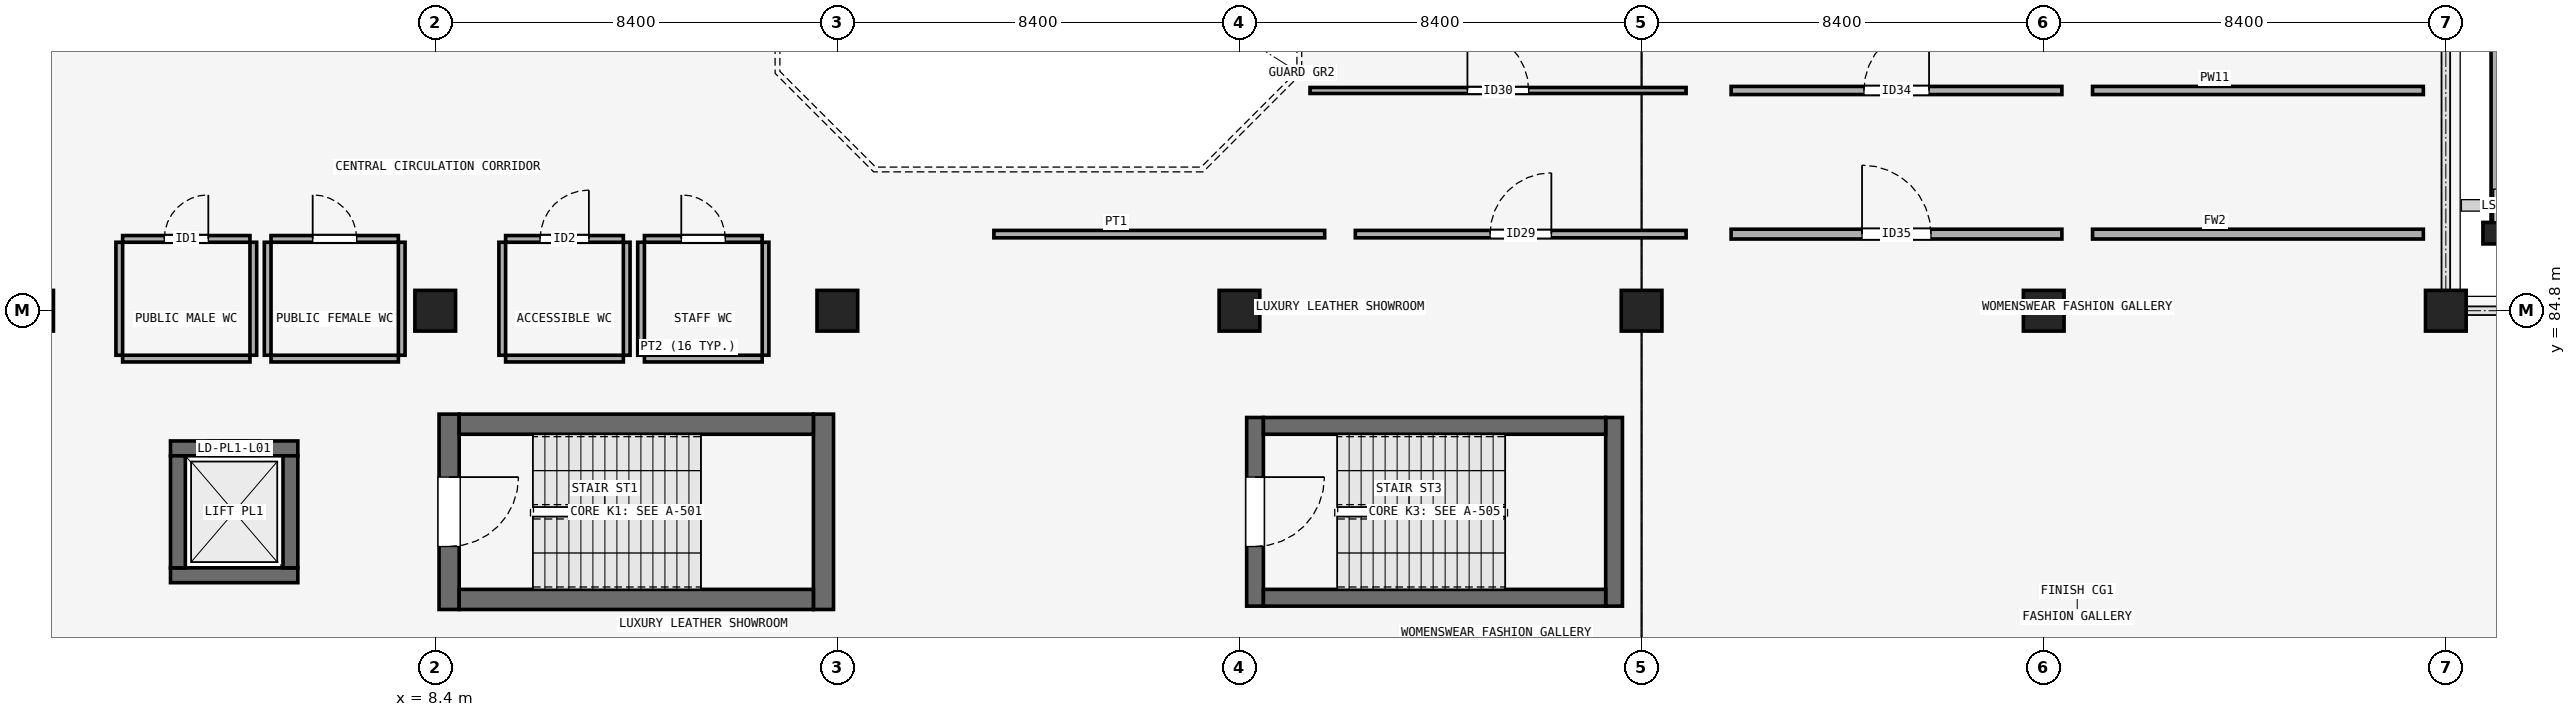
"""IFC4 building model, lengths in metres.
Left out: names, types, materials, properties, quantities, classifications, styles, units other than length and angle.
Written with IfcOpenShell. Run it as: python <this file> out.ifc"""

import sys

from ifc_helpers import new_model, si_unit, direction, frame, frame_2d, origin, origin_2d, place, context, subcontext, project, spatial, rectangle, extrude, element, fill, save


model = new_model("IFC4")
c1 = context("Model", 3, precision=1e-05, world=origin(), true_north=direction((0.0, 1.0)))
c2 = subcontext(c1, "Body", "Model", "MODEL_VIEW")
j1 = project(units=[si_unit("LENGTHUNIT", "METRE"), si_unit("PLANEANGLEUNIT", "RADIAN")], contexts=[c1])
p1 = place(None, origin())
s1 = spatial("IfcSite", under=j1, at=p1, CompositionType="ELEMENT")
p2 = place(p1, origin())
s2 = spatial("IfcBuilding", under=s1, at=p2, CompositionType="ELEMENT")
p3 = place(p2, frame((0.0, 0.0, 5.4)))
s3 = spatial("IfcBuildingStorey", under=s2, at=p3, CompositionType="ELEMENT", Elevation=5.4)
for number, where, z_axis, x_axis in (
    (1, (0.0, 84.8, 0.0), (0.0, 0.0, 1.0), (1.0, 0.0, 0.0)),
    (2, (8.4, 84.8, 0.0), (0.0, 0.0, 1.0), (1.0, 0.0, 0.0)),
    (3, (16.8, 84.8, 0.0), (0.0, 0.0, 1.0), (1.0, 0.0, 0.0)),
    (4, (25.2, 84.8, 0.0), (0.0, 0.0, 1.0), (1.0, 0.0, 0.0)),
    (5, (33.6, 84.8, 0.0), (0.0, 0.0, 1.0), (1.0, 0.0, 0.0)),
    (6, (42.0, 84.8, 0.0), (0.0, 0.0, 1.0), (1.0, 0.0, 0.0)),
    (7, (50.4, 84.8, 0.0), (0.0, 0.0, 1.0), (1.0, 0.0, 0.0)),
):
    element("IfcColumn", number, at=place(p3, frame(where, z_axis=z_axis, x_axis=x_axis)), inside=s3, PredefinedType="COLUMN", context=c2, shape_type="SweptSolid", body=[
        extrude(rectangle(XDim=0.85, YDim=0.85, at=origin_2d()), origin(), (0.0, 0.0, 1.0), 4.5),
    ])
p4 = place(p3, frame((51.45, 86.42, 0.0), z_axis=(0.0, 0.0, 1.0), x_axis=(0.0, 1.0, 0.0)))
e8 = element("IfcColumn", 8, at=p4, inside=s3, PredefinedType="PILASTER", context=c2, shape_type="SweptSolid", body=[
    extrude(rectangle(XDim=0.45, YDim=0.55, at=origin_2d()), origin(), (0.0, 0.0, 1.0), 4.5),
])
p5 = place(p3, frame((51.45, 86.67, 3.88), z_axis=(0.0, 0.0, 1.0), x_axis=(0.0, 1.0, 0.0)))
e9 = element("IfcWall", 9, at=p5, inside=s3, PredefinedType="PARAPET", context=c2, shape_type="SweptSolid", body=[
    extrude(rectangle(XDim=4.66, YDim=0.21, at=frame_2d((2.33, 0.0))), origin(), (0.0, 0.0, 1.0), 0.12),
])
p6 = place(p3, frame((8.69, 82.64, 0.0), z_axis=(0.0, 0.0, 1.0), x_axis=(0.0, -1.0, 0.0)))
e10 = element("IfcWall", 10, at=p6, inside=s3, PredefinedType="SHEAR", context=c2, shape_type="SweptSolid", body=[
    extrude(rectangle(XDim=4.08, YDim=0.42, at=frame_2d((2.04, 0.0))), origin(), (0.0, 0.0, 1.0), 4.2),
])
p7 = place(p6, frame((1.315, 0.0, 0.0)))
e11 = element("IfcOpeningElement", 11, at=p7, cuts=e10, PredefinedType="OPENING", context=c2, shape_type="SweptSolid", body=[
    extrude(rectangle(XDim=1.45, YDim=2.2, at=frame_2d((0.725, 1.1))), frame((0.0, 0.22, 0.0), z_axis=(0.0, -1.0, 0.0), x_axis=(1.0, 0.0, 0.0)), (0.0, 0.0, 1.0), 0.44),
])
p8 = place(p3, frame((16.51, 78.56, 0.0), z_axis=(0.0, 0.0, 1.0), x_axis=(0.0, 1.0, 0.0)))
e12 = element("IfcWall", 12, at=p8, inside=s3, PredefinedType="SHEAR", context=c2, shape_type="SweptSolid", body=[
    extrude(rectangle(XDim=4.08, YDim=0.42, at=frame_2d((2.04, 0.0))), origin(), (0.0, 0.0, 1.0), 4.2),
])
for number, where, z_axis, x_axis in (
    (13, (8.9, 78.77, 0.0), (0.0, 0.0, 1.0), (1.0, 0.0, 0.0)),
    (14, (8.9, 82.43, 0.0), (0.0, 0.0, 1.0), (1.0, 0.0, 0.0)),
):
    element("IfcWall", number, at=place(p3, frame(where, z_axis=z_axis, x_axis=x_axis)), inside=s3, PredefinedType="SHEAR", context=c2, shape_type="SweptSolid", body=[
        extrude(rectangle(XDim=7.4, YDim=0.42, at=frame_2d((3.7, 0.0))), origin(), (0.0, 0.0, 1.0), 4.2),
    ])
p9 = place(p3, frame((25.525, 82.57, 0.0), z_axis=(0.0, 0.0, 1.0), x_axis=(0.0, -1.0, 0.0)))
e15 = element("IfcWall", 15, at=p9, inside=s3, PredefinedType="SHEAR", context=c2, shape_type="SweptSolid", body=[
    extrude(rectangle(XDim=3.94, YDim=0.35, at=frame_2d((1.97, 0.0))), origin(), (0.0, 0.0, 1.0), 4.2),
])
p10 = place(p9, frame((1.245, 0.0, 0.0)))
e16 = element("IfcOpeningElement", 16, at=p10, cuts=e15, PredefinedType="OPENING", context=c2, shape_type="SweptSolid", body=[
    extrude(rectangle(XDim=1.45, YDim=2.2, at=frame_2d((0.725, 1.1))), frame((0.0, 0.185, 0.0), z_axis=(0.0, -1.0, 0.0), x_axis=(1.0, 0.0, 0.0)), (0.0, 0.0, 1.0), 0.37),
])
p11 = place(p3, frame((33.025, 78.63, 0.0), z_axis=(0.0, 0.0, 1.0), x_axis=(0.0, 1.0, 0.0)))
e17 = element("IfcWall", 17, at=p11, inside=s3, PredefinedType="SHEAR", context=c2, shape_type="SweptSolid", body=[
    extrude(rectangle(XDim=3.94, YDim=0.35, at=frame_2d((1.97, 0.0))), origin(), (0.0, 0.0, 1.0), 4.2),
])
for number, where, z_axis, x_axis in (
    (18, (25.7, 78.805, 0.0), (0.0, 0.0, 1.0), (1.0, 0.0, 0.0)),
    (19, (25.7, 82.395, 0.0), (0.0, 0.0, 1.0), (1.0, 0.0, 0.0)),
):
    element("IfcWall", number, at=place(p3, frame(where, z_axis=z_axis, x_axis=x_axis)), inside=s3, PredefinedType="SHEAR", context=c2, shape_type="SweptSolid", body=[
        extrude(rectangle(XDim=7.15, YDim=0.35, at=frame_2d((3.575, 0.0))), origin(), (0.0, 0.0, 1.0), 4.2),
    ])
p12 = place(p3, frame((2.87, 79.275, 0.0), z_axis=(0.0, 0.0, 1.0), x_axis=(1.0, 0.0, 0.0)))
e20 = element("IfcWall", 20, at=p12, inside=s3, PredefinedType="SHEAR", context=c2, shape_type="SweptSolid", body=[
    extrude(rectangle(XDim=2.66, YDim=0.31, at=frame_2d((1.33, 0.0))), origin(), (0.0, 0.0, 1.0), 4.2),
])
p13 = place(p3, frame((2.87, 81.925, 0.0), z_axis=(0.0, 0.0, 1.0), x_axis=(1.0, 0.0, 0.0)))
e21 = element("IfcWall", 21, at=p13, inside=s3, PredefinedType="SHEAR", context=c2, shape_type="SweptSolid", body=[
    extrude(rectangle(XDim=2.66, YDim=0.31, at=frame_2d((1.33, 0.0))), origin(), (0.0, 0.0, 1.0), 4.2),
])
p14 = place(p13, frame((0.78, 0.0, 0.0)))
e22 = element("IfcOpeningElement", 22, at=p14, cuts=e21, PredefinedType="OPENING", context=c2, shape_type="SweptSolid", body=[
    extrude(rectangle(XDim=1.1, YDim=2.2, at=frame_2d((0.55, 1.1))), frame((0.0, 0.165, 0.0), z_axis=(0.0, -1.0, 0.0), x_axis=(1.0, 0.0, 0.0)), (0.0, 0.0, 1.0), 0.33),
])
for number, where, z_axis, x_axis in (
    (23, (3.025, 79.43, 0.0), (0.0, 0.0, 1.0), (0.0, 1.0, 0.0)),
    (24, (5.375, 79.43, 0.0), (0.0, 0.0, 1.0), (0.0, 1.0, 0.0)),
):
    element("IfcWall", number, at=place(p3, frame(where, z_axis=z_axis, x_axis=x_axis)), inside=s3, PredefinedType="SHEAR", context=c2, shape_type="SweptSolid", body=[
        extrude(rectangle(XDim=2.34, YDim=0.31, at=frame_2d((1.17, 0.0))), origin(), (0.0, 0.0, 1.0), 4.2),
    ])
p15 = place(p3, frame((1.87, 86.3, 0.0), z_axis=(0.0, 0.0, 1.0), x_axis=(1.0, 0.0, 0.0)))
e25 = element("IfcWall", 25, at=p15, inside=s3, PredefinedType="PARTITIONING", context=c2, shape_type="SweptSolid", body=[
    extrude(rectangle(XDim=2.66, YDim=0.14, at=frame_2d((1.33, 0.0))), origin(), (0.0, 0.0, 1.0), 4.2),
])
p16 = place(p15, frame((0.87, 0.0, 0.0)))
e26 = element("IfcOpeningElement", 26, at=p16, cuts=e25, PredefinedType="OPENING", context=c2, shape_type="SweptSolid", body=[
    extrude(rectangle(XDim=0.92, YDim=2.12, at=frame_2d((0.46, 1.06))), frame((0.0, 0.08, 0.0), z_axis=(0.0, -1.0, 0.0), x_axis=(1.0, 0.0, 0.0)), (0.0, 0.0, 1.0), 0.16),
])
p17 = place(p3, frame((1.87, 83.8, 0.0), z_axis=(0.0, 0.0, 1.0), x_axis=(1.0, 0.0, 0.0)))
e27 = element("IfcWall", 27, at=p17, inside=s3, PredefinedType="PARTITIONING", context=c2, shape_type="SweptSolid", body=[
    extrude(rectangle(XDim=2.66, YDim=0.14, at=frame_2d((1.33, 0.0))), origin(), (0.0, 0.0, 1.0), 4.2),
])
for number, where, z_axis, x_axis in (
    (28, (1.8, 83.87, 0.0), (0.0, 0.0, 1.0), (0.0, 1.0, 0.0)),
    (29, (4.6, 83.87, 0.0), (0.0, 0.0, 1.0), (0.0, 1.0, 0.0)),
):
    element("IfcWall", number, at=place(p3, frame(where, z_axis=z_axis, x_axis=x_axis)), inside=s3, PredefinedType="PARTITIONING", context=c2, shape_type="SweptSolid", body=[
        extrude(rectangle(XDim=2.36, YDim=0.14, at=frame_2d((1.18, 0.0))), origin(), (0.0, 0.0, 1.0), 3.45),
    ])
p18 = place(p3, frame((4.97, 86.3, 0.0), z_axis=(0.0, 0.0, 1.0), x_axis=(1.0, 0.0, 0.0)))
e30 = element("IfcWall", 30, at=p18, inside=s3, PredefinedType="PARTITIONING", context=c2, shape_type="SweptSolid", body=[
    extrude(rectangle(XDim=2.66, YDim=0.14, at=frame_2d((1.33, 0.0))), origin(), (0.0, 0.0, 1.0), 4.2),
])
p19 = place(p18, frame((0.87, 0.0, 0.0)))
e31 = element("IfcOpeningElement", 31, at=p19, cuts=e30, PredefinedType="OPENING", context=c2, shape_type="SweptSolid", body=[
    extrude(rectangle(XDim=0.92, YDim=2.12, at=frame_2d((0.46, 1.06))), frame((0.0, 0.08, 0.0), z_axis=(0.0, -1.0, 0.0), x_axis=(1.0, 0.0, 0.0)), (0.0, 0.0, 1.0), 0.16),
])
p20 = place(p3, frame((4.97, 83.8, 0.0), z_axis=(0.0, 0.0, 1.0), x_axis=(1.0, 0.0, 0.0)))
e32 = element("IfcWall", 32, at=p20, inside=s3, PredefinedType="PARTITIONING", context=c2, shape_type="SweptSolid", body=[
    extrude(rectangle(XDim=2.66, YDim=0.14, at=frame_2d((1.33, 0.0))), origin(), (0.0, 0.0, 1.0), 4.2),
])
for number, where, z_axis, x_axis in (
    (33, (4.9, 83.87, 0.0), (0.0, 0.0, 1.0), (0.0, 1.0, 0.0)),
    (34, (7.7, 83.87, 0.0), (0.0, 0.0, 1.0), (0.0, 1.0, 0.0)),
):
    element("IfcWall", number, at=place(p3, frame(where, z_axis=z_axis, x_axis=x_axis)), inside=s3, PredefinedType="PARTITIONING", context=c2, shape_type="SweptSolid", body=[
        extrude(rectangle(XDim=2.36, YDim=0.14, at=frame_2d((1.18, 0.0))), origin(), (0.0, 0.0, 1.0), 3.45),
    ])
p21 = place(p3, frame((9.87, 86.3, 0.0), z_axis=(0.0, 0.0, 1.0), x_axis=(1.0, 0.0, 0.0)))
e35 = element("IfcWall", 35, at=p21, inside=s3, PredefinedType="PARTITIONING", context=c2, shape_type="SweptSolid", body=[
    extrude(rectangle(XDim=2.46, YDim=0.14, at=frame_2d((1.23, 0.0))), origin(), (0.0, 0.0, 1.0), 4.2),
])
p22 = place(p21, frame((0.72, 0.0, 0.0)))
e36 = element("IfcOpeningElement", 36, at=p22, cuts=e35, PredefinedType="OPENING", context=c2, shape_type="SweptSolid", body=[
    extrude(rectangle(XDim=1.02, YDim=2.15, at=frame_2d((0.51, 1.075))), frame((0.0, 0.08, 0.0), z_axis=(0.0, -1.0, 0.0), x_axis=(1.0, 0.0, 0.0)), (0.0, 0.0, 1.0), 0.16),
])
p23 = place(p3, frame((9.87, 83.8, 0.0), z_axis=(0.0, 0.0, 1.0), x_axis=(1.0, 0.0, 0.0)))
e37 = element("IfcWall", 37, at=p23, inside=s3, PredefinedType="PARTITIONING", context=c2, shape_type="SweptSolid", body=[
    extrude(rectangle(XDim=2.46, YDim=0.14, at=frame_2d((1.23, 0.0))), origin(), (0.0, 0.0, 1.0), 4.2),
])
for number, where, z_axis, x_axis in (
    (38, (9.8, 83.87, 0.0), (0.0, 0.0, 1.0), (0.0, 1.0, 0.0)),
    (39, (12.4, 83.87, 0.0), (0.0, 0.0, 1.0), (0.0, 1.0, 0.0)),
):
    element("IfcWall", number, at=place(p3, frame(where, z_axis=z_axis, x_axis=x_axis)), inside=s3, PredefinedType="PARTITIONING", context=c2, shape_type="SweptSolid", body=[
        extrude(rectangle(XDim=2.36, YDim=0.14, at=frame_2d((1.18, 0.0))), origin(), (0.0, 0.0, 1.0), 3.45),
    ])
p24 = place(p3, frame((12.77, 86.3, 0.0), z_axis=(0.0, 0.0, 1.0), x_axis=(1.0, 0.0, 0.0)))
e40 = element("IfcWall", 40, at=p24, inside=s3, PredefinedType="PARTITIONING", context=c2, shape_type="SweptSolid", body=[
    extrude(rectangle(XDim=2.46, YDim=0.14, at=frame_2d((1.23, 0.0))), origin(), (0.0, 0.0, 1.0), 4.2),
])
p25 = place(p24, frame((0.77, 0.0, 0.0)))
e41 = element("IfcOpeningElement", 41, at=p25, cuts=e40, PredefinedType="OPENING", context=c2, shape_type="SweptSolid", body=[
    extrude(rectangle(XDim=0.92, YDim=2.12, at=frame_2d((0.46, 1.06))), frame((0.0, 0.08, 0.0), z_axis=(0.0, -1.0, 0.0), x_axis=(1.0, 0.0, 0.0)), (0.0, 0.0, 1.0), 0.16),
])
p26 = place(p3, frame((12.77, 83.8, 0.0), z_axis=(0.0, 0.0, 1.0), x_axis=(1.0, 0.0, 0.0)))
e42 = element("IfcWall", 42, at=p26, inside=s3, PredefinedType="PARTITIONING", context=c2, shape_type="SweptSolid", body=[
    extrude(rectangle(XDim=2.46, YDim=0.14, at=frame_2d((1.23, 0.0))), origin(), (0.0, 0.0, 1.0), 4.2),
])
for number, where, z_axis, x_axis in (
    (43, (12.7, 83.87, 0.0), (0.0, 0.0, 1.0), (0.0, 1.0, 0.0)),
    (44, (15.3, 83.87, 0.0), (0.0, 0.0, 1.0), (0.0, 1.0, 0.0)),
):
    element("IfcWall", number, at=place(p3, frame(where, z_axis=z_axis, x_axis=x_axis)), inside=s3, PredefinedType="PARTITIONING", context=c2, shape_type="SweptSolid", body=[
        extrude(rectangle(XDim=2.36, YDim=0.14, at=frame_2d((1.18, 0.0))), origin(), (0.0, 0.0, 1.0), 3.45),
    ])
p27 = place(p3, frame((20.07, 86.4, 0.0), z_axis=(0.0, 0.0, 1.0), x_axis=(1.0, 0.0, 0.0)))
e45 = element("IfcWall", 45, at=p27, inside=s3, PredefinedType="PARTITIONING", context=c2, shape_type="SweptSolid", body=[
    extrude(rectangle(XDim=6.91, YDim=0.155, at=frame_2d((3.455, 0.0))), origin(), (0.0, 0.0, 1.0), 4.2),
])
p28 = place(p3, frame((27.62, 86.4, 0.0), z_axis=(0.0, 0.0, 1.0), x_axis=(1.0, 0.0, 0.0)))
e46 = element("IfcWall", 46, at=p28, inside=s3, PredefinedType="PARTITIONING", context=c2, shape_type="SweptSolid", body=[
    extrude(rectangle(XDim=6.91, YDim=0.155, at=frame_2d((3.455, 0.0))), origin(), (0.0, 0.0, 1.0), 3.45),
])
p29 = place(p28, frame((2.815, 0.0, 0.0)))
e47 = element("IfcOpeningElement", 47, at=p29, cuts=e46, PredefinedType="OPENING", context=c2, shape_type="SweptSolid", body=[
    extrude(rectangle(XDim=1.28, YDim=2.34, at=frame_2d((0.64, 1.17))), frame((0.0, 0.087, 0.0), z_axis=(0.0, -1.0, 0.0), x_axis=(1.0, 0.0, 0.0)), (0.0, 0.0, 1.0), 0.175),
])
p30 = place(p3, frame((26.674, 89.4, 0.0), z_axis=(0.0, 0.0, 1.0), x_axis=(1.0, 0.0, 0.0)))
e48 = element("IfcWall", 48, at=p30, inside=s3, PredefinedType="PARTITIONING", context=c2, shape_type="SweptSolid", body=[
    extrude(rectangle(XDim=7.856, YDim=0.125, at=frame_2d((3.928, 0.0))), origin(), (0.0, 0.0, 1.0), 3.45),
])
p31 = place(p30, frame((3.288, 0.0, 0.0)))
e49 = element("IfcOpeningElement", 49, at=p31, cuts=e48, PredefinedType="OPENING", context=c2, shape_type="SweptSolid", body=[
    extrude(rectangle(XDim=1.28, YDim=2.46, at=frame_2d((0.64, 1.23))), frame((0.0, 0.073, 0.0), z_axis=(0.0, -1.0, 0.0), x_axis=(1.0, 0.0, 0.0)), (0.0, 0.0, 1.0), 0.145),
])
p32 = place(p3, frame((35.47, 89.4, 0.0), z_axis=(0.0, 0.0, 1.0), x_axis=(1.0, 0.0, 0.0)))
e50 = element("IfcWall", 50, at=p32, inside=s3, PredefinedType="PARTITIONING", context=c2, shape_type="SweptSolid", body=[
    extrude(rectangle(XDim=6.91, YDim=0.17, at=frame_2d((3.455, 0.0))), origin(), (0.0, 0.0, 1.0), 3.45),
])
p33 = place(p32, frame((2.775, 0.0, 0.0)))
e51 = element("IfcOpeningElement", 51, at=p33, cuts=e50, PredefinedType="OPENING", context=c2, shape_type="SweptSolid", body=[
    extrude(rectangle(XDim=1.36, YDim=2.46, at=frame_2d((0.68, 1.23))), frame((0.0, 0.095, 0.0), z_axis=(0.0, -1.0, 0.0), x_axis=(1.0, 0.0, 0.0)), (0.0, 0.0, 1.0), 0.19),
])
p34 = place(p3, frame((43.02, 89.4, 0.0), z_axis=(0.0, 0.0, 1.0), x_axis=(1.0, 0.0, 0.0)))
e52 = element("IfcWall", 52, at=p34, inside=s3, PredefinedType="PARTITIONING", context=c2, shape_type="SweptSolid", body=[
    extrude(rectangle(XDim=6.91, YDim=0.17, at=frame_2d((3.455, 0.0))), origin(), (0.0, 0.0, 1.0), 4.2),
])
p35 = place(p3, frame((35.47, 86.4, 0.0), z_axis=(0.0, 0.0, 1.0), x_axis=(1.0, 0.0, 0.0)))
e53 = element("IfcWall", 53, at=p35, inside=s3, PredefinedType="PARTITIONING", context=c2, shape_type="SweptSolid", body=[
    extrude(rectangle(XDim=6.91, YDim=0.205, at=frame_2d((3.455, 0.0))), origin(), (0.0, 0.0, 1.0), 3.45),
])
p36 = place(p35, frame((2.735, 0.0, 0.0)))
e54 = element("IfcOpeningElement", 54, at=p36, cuts=e53, PredefinedType="OPENING", context=c2, shape_type="SweptSolid", body=[
    extrude(rectangle(XDim=1.44, YDim=2.1, at=frame_2d((0.72, 1.05))), frame((0.0, 0.113, 0.0), z_axis=(0.0, -1.0, 0.0), x_axis=(1.0, 0.0, 0.0)), (0.0, 0.0, 1.0), 0.225),
])
p37 = place(p3, frame((43.02, 86.4, 0.0), z_axis=(0.0, 0.0, 1.0), x_axis=(1.0, 0.0, 0.0)))
e55 = element("IfcWall", 55, at=p37, inside=s3, PredefinedType="PARTITIONING", context=c2, shape_type="SweptSolid", body=[
    extrude(rectangle(XDim=6.91, YDim=0.205, at=frame_2d((3.455, 0.0))), origin(), (0.0, 0.0, 1.0), 4.2),
])
p38 = place(p7, origin())
e56 = element("IfcDoor", 56, at=p38, inside=s3, OperationType="SINGLE_SWING_LEFT", PredefinedType="DOOR", context=c2, shape_type="SweptSolid", body=[
    extrude(rectangle(XDim=1.45, YDim=2.2, at=frame_2d((0.725, 1.1))), frame((0.0, 0.025, 0.0), z_axis=(0.0, -1.0, 0.0), x_axis=(1.0, 0.0, 0.0)), (0.0, 0.0, 1.0), 0.05),
])
fill(e11, e56)
p39 = place(p10, origin())
e57 = element("IfcDoor", 57, at=p39, inside=s3, OperationType="SINGLE_SWING_LEFT", PredefinedType="DOOR", context=c2, shape_type="SweptSolid", body=[
    extrude(rectangle(XDim=1.45, YDim=2.2, at=frame_2d((0.725, 1.1))), frame((0.0, 0.025, 0.0), z_axis=(0.0, -1.0, 0.0), x_axis=(1.0, 0.0, 0.0)), (0.0, 0.0, 1.0), 0.05),
])
fill(e16, e57)
p40 = place(p14, origin())
e58 = element("IfcDoor", 58, at=p40, inside=s3, OperationType="SLIDING_TO_LEFT", PredefinedType="DOOR", context=c2, shape_type="SweptSolid", body=[
    extrude(rectangle(XDim=1.1, YDim=2.2, at=frame_2d((0.55, 1.1))), frame((0.0, 0.025, 0.0), z_axis=(0.0, -1.0, 0.0), x_axis=(1.0, 0.0, 0.0)), (0.0, 0.0, 1.0), 0.05),
])
fill(e22, e58)
p41 = place(p16, origin())
e59 = element("IfcDoor", 59, at=p41, inside=s3, OperationType="SINGLE_SWING_RIGHT", PredefinedType="DOOR", context=c2, shape_type="SweptSolid", body=[
    extrude(rectangle(XDim=0.92, YDim=2.12, at=frame_2d((0.46, 1.06))), frame((0.0, 0.025, 0.0), z_axis=(0.0, -1.0, 0.0), x_axis=(1.0, 0.0, 0.0)), (0.0, 0.0, 1.0), 0.05),
])
fill(e26, e59)
p42 = place(p19, origin())
e60 = element("IfcDoor", 60, at=p42, inside=s3, OperationType="SINGLE_SWING_LEFT", PredefinedType="DOOR", context=c2, shape_type="SweptSolid", body=[
    extrude(rectangle(XDim=0.92, YDim=2.12, at=frame_2d((0.46, 1.06))), frame((0.0, 0.025, 0.0), z_axis=(0.0, -1.0, 0.0), x_axis=(1.0, 0.0, 0.0)), (0.0, 0.0, 1.0), 0.05),
])
fill(e31, e60)
p43 = place(p22, origin())
e61 = element("IfcDoor", 61, at=p43, inside=s3, OperationType="SINGLE_SWING_RIGHT", PredefinedType="DOOR", context=c2, shape_type="SweptSolid", body=[
    extrude(rectangle(XDim=1.02, YDim=2.15, at=frame_2d((0.51, 1.075))), frame((0.0, 0.025, 0.0), z_axis=(0.0, -1.0, 0.0), x_axis=(1.0, 0.0, 0.0)), (0.0, 0.0, 1.0), 0.05),
])
fill(e36, e61)
p44 = place(p25, origin())
e62 = element("IfcDoor", 62, at=p44, inside=s3, OperationType="SINGLE_SWING_LEFT", PredefinedType="DOOR", context=c2, shape_type="SweptSolid", body=[
    extrude(rectangle(XDim=0.92, YDim=2.12, at=frame_2d((0.46, 1.06))), frame((0.0, 0.025, 0.0), z_axis=(0.0, -1.0, 0.0), x_axis=(1.0, 0.0, 0.0)), (0.0, 0.0, 1.0), 0.05),
])
fill(e41, e62)
p45 = place(p29, origin())
e63 = element("IfcDoor", 63, at=p45, inside=s3, OperationType="SINGLE_SWING_RIGHT", PredefinedType="DOOR", context=c2, shape_type="SweptSolid", body=[
    extrude(rectangle(XDim=1.28, YDim=2.34, at=frame_2d((0.64, 1.17))), frame((0.0, 0.025, 0.0), z_axis=(0.0, -1.0, 0.0), x_axis=(1.0, 0.0, 0.0)), (0.0, 0.0, 1.0), 0.05),
])
fill(e47, e63)
p46 = place(p31, origin())
e64 = element("IfcDoor", 64, at=p46, inside=s3, OperationType="SINGLE_SWING_LEFT", PredefinedType="DOOR", context=c2, shape_type="SweptSolid", body=[
    extrude(rectangle(XDim=1.28, YDim=2.46, at=frame_2d((0.64, 1.23))), frame((0.0, 0.025, 0.0), z_axis=(0.0, -1.0, 0.0), x_axis=(1.0, 0.0, 0.0)), (0.0, 0.0, 1.0), 0.05),
])
fill(e49, e64)
p47 = place(p33, origin())
e65 = element("IfcDoor", 65, at=p47, inside=s3, OperationType="SINGLE_SWING_RIGHT", PredefinedType="DOOR", context=c2, shape_type="SweptSolid", body=[
    extrude(rectangle(XDim=1.36, YDim=2.46, at=frame_2d((0.68, 1.23))), frame((0.0, 0.025, 0.0), z_axis=(0.0, -1.0, 0.0), x_axis=(1.0, 0.0, 0.0)), (0.0, 0.0, 1.0), 0.05),
])
fill(e51, e65)
p48 = place(p36, origin())
e66 = element("IfcDoor", 66, at=p48, inside=s3, OperationType="SINGLE_SWING_LEFT", PredefinedType="DOOR", context=c2, shape_type="SweptSolid", body=[
    extrude(rectangle(XDim=1.44, YDim=2.1, at=frame_2d((0.72, 1.05))), frame((0.0, 0.025, 0.0), z_axis=(0.0, -1.0, 0.0), x_axis=(1.0, 0.0, 0.0)), (0.0, 0.0, 1.0), 0.05),
])
fill(e54, e66)
save(model, sys.argv[1])
